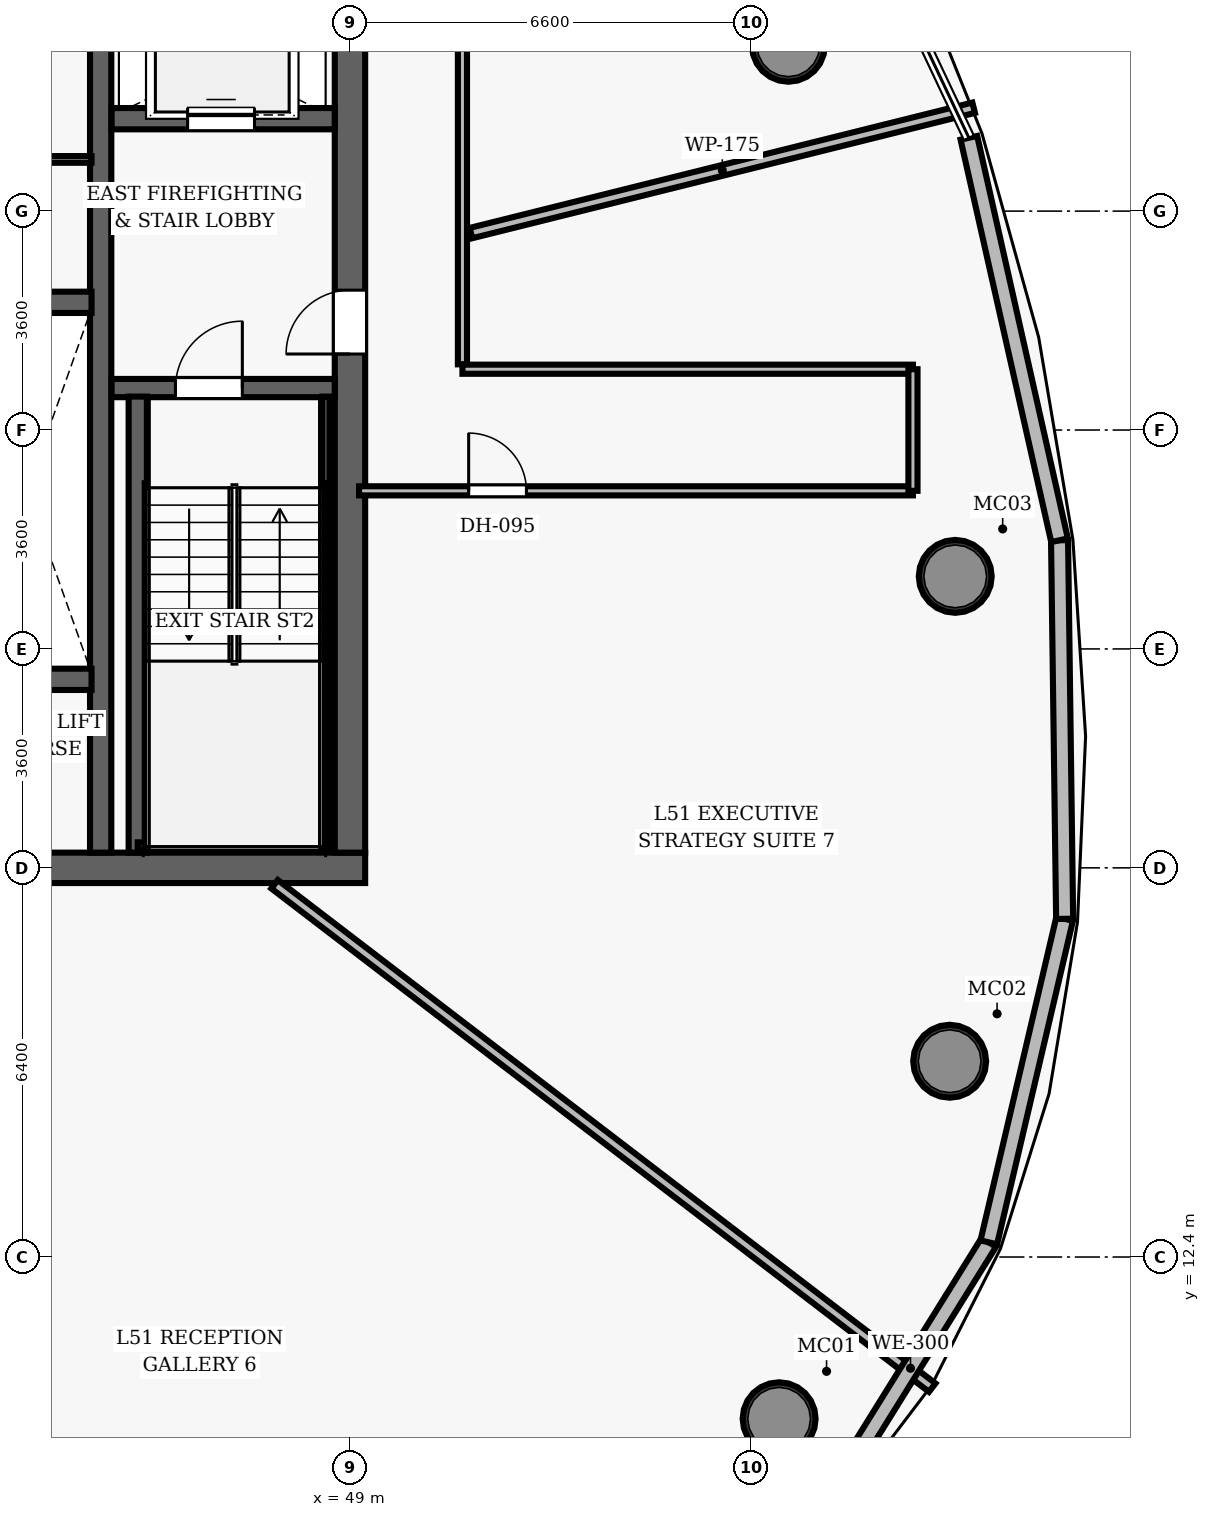
"""IFC4 building model, lengths in metres.
Left out: names, types, materials, properties, quantities, classifications, styles, units other than length and angle.
Written with IfcOpenShell. Run it as: python <this file> out.ifc"""

import sys

from ifc_helpers import new_model, si_unit, direction, frame, frame_2d, origin, origin_2d, place, context, subcontext, project, spatial, rectangle, hollow_circle, extrude, element, fill, save


model = new_model("IFC4")
c1 = context("Model", 3, precision=1e-05, world=origin(), true_north=direction((0.0, 1.0)))
c2 = subcontext(c1, "Body", "Model", "MODEL_VIEW")
j1 = project(units=[si_unit("LENGTHUNIT", "METRE"), si_unit("PLANEANGLEUNIT", "RADIAN")], contexts=[c1])
p1 = place(None, origin())
s1 = spatial("IfcSite", under=j1, at=p1, CompositionType="ELEMENT")
p2 = place(p1, origin())
s2 = spatial("IfcBuilding", under=s1, at=p2, CompositionType="ELEMENT")
p3 = place(p2, frame((0.0, 0.0, 202.0)))
s3 = spatial("IfcBuildingStorey", under=s2, at=p3, CompositionType="ELEMENT", Elevation=202.0)
p4 = place(p3, frame((26.75, 18.8, 0.0), z_axis=(0.0, 0.0, 1.0), x_axis=(1.0, 0.0, 0.0)))
e1 = element("IfcWall", 1, at=p4, inside=s3, PredefinedType="SHEAR", context=c2, shape_type="SweptSolid", body=[
    extrude(rectangle(XDim=22.5, YDim=0.5, at=frame_2d((11.25, 0.0))), origin(), (0.0, 0.0, 1.0), 3.85),
])
p5 = place(p4, frame((14.47, 0.0, 0.0)))
e2 = element("IfcOpeningElement", 2, at=p5, cuts=e1, PredefinedType="OPENING", context=c2, shape_type="SweptSolid", body=[
    extrude(rectangle(XDim=1.05, YDim=2.15, at=frame_2d((0.525, 1.075))), frame((0.0, 0.26, 0.0), z_axis=(0.0, -1.0, 0.0), x_axis=(1.0, 0.0, 0.0)), (0.0, 0.0, 1.0), 0.52),
])
p6 = place(p3, frame((49.0, 19.05, 0.0), z_axis=(0.0, 0.0, 1.0), x_axis=(0.0, 1.0, 0.0)))
e3 = element("IfcWall", 3, at=p6, inside=s3, PredefinedType="SHEAR", context=c2, shape_type="SweptSolid", body=[
    extrude(rectangle(XDim=13.9, YDim=0.5, at=frame_2d((6.95, 0.0))), origin(), (0.0, 0.0, 1.0), 3.85),
])
p7 = place(p6, frame((8.2, 0.0, 0.0)))
e4 = element("IfcOpeningElement", 4, at=p7, cuts=e3, PredefinedType="OPENING", context=c2, shape_type="SweptSolid", body=[
    extrude(rectangle(XDim=1.05, YDim=2.15, at=frame_2d((0.525, 1.075))), frame((0.0, 0.26, 0.0), z_axis=(0.0, -1.0, 0.0), x_axis=(1.0, 0.0, 0.0)), (0.0, 0.0, 1.0), 0.52),
])
p8 = place(p3, frame((44.9, 19.05, 0.0), z_axis=(0.0, 0.0, 1.0), x_axis=(0.0, 1.0, 0.0)))
e5 = element("IfcWall", 5, at=p8, inside=s3, PredefinedType="SHEAR", context=c2, shape_type="SweptSolid", body=[
    extrude(rectangle(XDim=13.9, YDim=0.35, at=frame_2d((6.95, 0.0))), origin(), (0.0, 0.0, 1.0), 3.85),
])
for number, where, z_axis, x_axis in (
    (6, (56.058, 9.74, 0.0), (0.0, 0.0, 1.0), (1.0, 0.0, 0.0)),
    (7, (58.863, 15.619, 0.0), (0.0, 0.0, 1.0), (1.0, 0.0, 0.0)),
    (8, (58.955, 23.594, 0.0), (0.0, 0.0, 1.0), (1.0, 0.0, 0.0)),
    (9, (56.21, 32.327, 0.0), (0.0, 0.0, 1.0), (1.0, 0.0, 0.0)),
):
    element("IfcColumn", number, at=place(p3, frame(where, z_axis=z_axis, x_axis=x_axis)), inside=s3, PredefinedType="COLUMN", context=c2, shape_type="SweptSolid", body=[
        extrude(hollow_circle(Radius=0.6, WallThickness=0.05, at=origin_2d()), origin(), (0.0, 0.0, 1.0), 3.85),
    ])
p9 = place(p3, frame((45.08, 26.69, 0.0), z_axis=(0.0, 0.0, 1.0), x_axis=(1.0, 0.0, 0.0)))
e10 = element("IfcWall", 10, at=p9, inside=s3, PredefinedType="SHEAR", context=c2, shape_type="SweptSolid", body=[
    extrude(rectangle(XDim=3.67, YDim=0.3, at=frame_2d((1.835, 0.0))), origin(), (0.0, 0.0, 1.0), 3.85),
])
p10 = place(p9, frame((1.05, 0.0, 0.0)))
e11 = element("IfcOpeningElement", 11, at=p10, cuts=e10, PredefinedType="OPENING", context=c2, shape_type="SweptSolid", body=[
    extrude(rectangle(XDim=1.1, YDim=2.15, at=frame_2d((0.55, 1.075))), frame((0.0, 0.16, 0.0), z_axis=(0.0, -1.0, 0.0), x_axis=(1.0, 0.0, 0.0)), (0.0, 0.0, 1.0), 0.32),
])
p11 = place(p3, frame((45.51, 19.05, 0.0), z_axis=(0.0, 0.0, 1.0), x_axis=(0.0, 1.0, 0.0)))
e12 = element("IfcWall", 12, at=p11, inside=s3, PredefinedType="SHEAR", context=c2, shape_type="SweptSolid", body=[
    extrude(rectangle(XDim=7.5, YDim=0.3, at=frame_2d((3.75, 0.0))), origin(), (0.0, 0.0, 1.0), 3.85),
])
p12 = place(p3, frame((48.605, 19.1, 0.0), z_axis=(0.0, 0.0, 1.0), x_axis=(0.0, 1.0, 0.0)))
e13 = element("IfcWall", 13, at=p12, inside=s3, PredefinedType="SHEAR", context=c2, shape_type="SweptSolid", body=[
    extrude(rectangle(XDim=7.45, YDim=0.12, at=frame_2d((3.725, 0.0))), origin(), (0.0, 0.0, 1.0), 3.85),
])
p13 = place(p3, frame((45.51, 19.16, 0.0), z_axis=(0.0, 0.0, 1.0), x_axis=(1.0, 0.0, 0.0)))
e14 = element("IfcWall", 14, at=p13, inside=s3, PredefinedType="SHEAR", context=c2, shape_type="SweptSolid", body=[
    extrude(rectangle(XDim=3.095, YDim=0.12, at=frame_2d((1.547, 0.0))), origin(), (0.0, 0.0, 1.0), 3.85),
])
p14 = place(p3, frame((45.08, 31.12, 0.0), z_axis=(0.0, 0.0, 1.0), x_axis=(1.0, 0.0, 0.0)))
e15 = element("IfcWall", 15, at=p14, inside=s3, PredefinedType="SHEAR", context=c2, shape_type="SweptSolid", body=[
    extrude(rectangle(XDim=3.67, YDim=0.35, at=frame_2d((1.835, 0.0))), origin(), (0.0, 0.0, 1.0), 3.035),
])
p15 = place(p14, frame((1.25, 0.0, 0.0)))
e16 = element("IfcOpeningElement", 16, at=p15, cuts=e15, PredefinedType="OPENING", context=c2, shape_type="SweptSolid", body=[
    extrude(rectangle(XDim=1.1, YDim=2.15, at=frame_2d((0.55, 1.075))), frame((0.0, 0.185, 0.0), z_axis=(0.0, -1.0, 0.0), x_axis=(1.0, 0.0, 0.0)), (0.0, 0.0, 1.0), 0.37),
])
for number, where, z_axis, x_axis in (
    (17, (42.72, 21.9, 0.0), (0.0, 0.0, 1.0), (1.0, 0.0, 0.0)),
    (18, (42.72, 28.1, 0.0), (0.0, 0.0, 1.0), (1.0, 0.0, 0.0)),
):
    element("IfcWall", number, at=place(p3, frame(where, z_axis=z_axis, x_axis=x_axis)), inside=s3, PredefinedType="SHEAR", context=c2, shape_type="SweptSolid", body=[
        extrude(rectangle(XDim=2.03, YDim=0.35, at=frame_2d((1.015, 0.0))), origin(), (0.0, 0.0, 1.0), 3.035),
    ])
p16 = place(p3, frame((42.55, 30.45, 0.0), z_axis=(0.0, 0.0, 1.0), x_axis=(1.0, 0.0, 0.0)))
e19 = element("IfcWall", 19, at=p16, inside=s3, PredefinedType="PARTITIONING", context=c2, shape_type="SweptSolid", body=[
    extrude(rectangle(XDim=2.2, YDim=0.11, at=frame_2d((1.1, 0.0))), origin(), (0.0, 0.0, 1.0), 3.035),
])
p17 = place(p3, frame((50.85, 27.08, 0.0), z_axis=(0.0, 0.0, 1.0), x_axis=(0.0, 1.0, 0.0)))
e20 = element("IfcWall", 20, at=p17, inside=s3, PredefinedType="PARTITIONING", context=c2, shape_type="SweptSolid", body=[
    extrude(rectangle(XDim=8.12, YDim=0.15, at=frame_2d((4.06, 0.0))), origin(), (0.0, 0.0, 1.0), 3.035),
])
p18 = place(p3, frame((50.85, 27.0, 0.0), z_axis=(0.0, 0.0, 1.0), x_axis=(1.0, 0.0, 0.0)))
e21 = element("IfcWall", 21, at=p18, inside=s3, PredefinedType="PARTITIONING", context=c2, shape_type="SweptSolid", body=[
    extrude(rectangle(XDim=7.409, YDim=0.15, at=frame_2d((3.705, 0.0))), origin(), (0.0, 0.0, 1.0), 3.035),
])
p19 = place(p3, frame((49.15, 25.0, 0.0), z_axis=(0.0, 0.0, 1.0), x_axis=(1.0, 0.0, 0.0)))
e22 = element("IfcWall", 22, at=p19, inside=s3, PredefinedType="PARTITIONING", context=c2, shape_type="SweptSolid", body=[
    extrude(rectangle(XDim=9.109, YDim=0.15, at=frame_2d((4.555, 0.0))), origin(), (0.0, 0.0, 1.0), 3.035),
])
p20 = place(p19, frame((1.802, 0.0, 0.0)))
e23 = element("IfcOpeningElement", 23, at=p20, cuts=e22, PredefinedType="OPENING", context=c2, shape_type="SweptSolid", body=[
    extrude(rectangle(XDim=0.95, YDim=2.15, at=frame_2d((0.475, 1.075))), frame((0.0, 0.085, 0.0), z_axis=(0.0, -1.0, 0.0), x_axis=(1.0, 0.0, 0.0)), (0.0, 0.0, 1.0), 0.17),
])
p21 = place(p3, frame((58.259, 25.0, 0.0), z_axis=(0.0, 0.0, 1.0), x_axis=(0.0, 1.0, 0.0)))
e24 = element("IfcWall", 24, at=p21, inside=s3, PredefinedType="PARTITIONING", context=c2, shape_type="SweptSolid", body=[
    extrude(rectangle(XDim=2.0, YDim=0.15, at=frame_2d((1.0, 0.0))), origin(), (0.0, 0.0, 1.0), 3.035),
])
p22 = place(p3, frame((50.99, 29.239, 0.0), z_axis=(0.0, 0.0, 1.0), x_axis=(0.970292315067, 0.241935576803, 0.0)))
e25 = element("IfcWall", 25, at=p22, inside=s3, PredefinedType="PARTITIONING", context=c2, shape_type="SweptSolid", body=[
    extrude(rectangle(XDim=8.521, YDim=0.175, at=frame_2d((4.26, 0.0))), origin(), (0.0, 0.0, 1.0), 3.035),
])
p23 = place(p3, frame((47.76, 18.53, 0.0), z_axis=(0.0, 0.0, 1.0), x_axis=(0.794115585975, -0.607766761276, 0.0)))
e26 = element("IfcWall", 26, at=p23, inside=s3, PredefinedType="PARTITIONING", context=c2, shape_type="SweptSolid", body=[
    extrude(rectangle(XDim=13.62, YDim=0.175, at=frame_2d((6.81, 0.0))), origin(), (0.0, 0.0, 1.0), 3.035),
])
p24 = place(p3, frame((59.506, 12.641, 0.0), z_axis=(0.0, 0.0, 1.0), x_axis=(-0.528161516042, -0.849143929479, 0.0)))
e27 = element("IfcWall", 27, at=p24, inside=s3, PredefinedType="SOLIDWALL", context=c2, shape_type="SweptSolid", body=[
    extrude(rectangle(XDim=4.876, YDim=0.28, at=frame_2d((2.438, 0.0))), origin(), (0.0, 0.0, 1.0), 3.62),
])
p25 = place(p3, frame((60.754, 17.961, 0.0), z_axis=(0.0, 0.0, 1.0), x_axis=(-0.228307127512, -0.97358916157, 0.0)))
e28 = element("IfcWall", 28, at=p25, inside=s3, PredefinedType="SOLIDWALL", context=c2, shape_type="SweptSolid", body=[
    extrude(rectangle(XDim=5.464, YDim=0.28, at=frame_2d((2.732, 0.0))), origin(), (0.0, 0.0, 1.0), 3.62),
])
p26 = place(p3, frame((60.67, 24.187, 0.0), z_axis=(0.0, 0.0, 1.0), x_axis=(0.013448709112, -0.999909562022, 0.0)))
e29 = element("IfcWall", 29, at=p26, inside=s3, PredefinedType="SOLIDWALL", context=c2, shape_type="SweptSolid", body=[
    extrude(rectangle(XDim=6.227, YDim=0.28, at=frame_2d((3.113, 0.0))), origin(), (0.0, 0.0, 1.0), 3.62),
])
p27 = place(p3, frame((59.179, 30.806, 0.0), z_axis=(0.0, 0.0, 1.0), x_axis=(0.219794754914, -0.975546137152, 0.0)))
e30 = element("IfcWall", 30, at=p27, inside=s3, PredefinedType="SOLIDWALL", context=c2, shape_type="SweptSolid", body=[
    extrude(rectangle(XDim=6.785, YDim=0.28, at=frame_2d((3.392, 0.0))), origin(), (0.0, 0.0, 1.0), 3.62),
])
p28 = place(p10, origin())
e31 = element("IfcDoor", 31, at=p28, inside=s3, OperationType="SINGLE_SWING_RIGHT", PredefinedType="DOOR", context=c2, shape_type="SweptSolid", body=[
    extrude(rectangle(XDim=1.1, YDim=2.15, at=frame_2d((0.55, 1.075))), frame((0.0, 0.025, 0.0), z_axis=(0.0, -1.0, 0.0), x_axis=(1.0, 0.0, 0.0)), (0.0, 0.0, 1.0), 0.05),
])
fill(e11, e31)
p29 = place(p7, origin())
e32 = element("IfcDoor", 32, at=p29, inside=s3, OperationType="SINGLE_SWING_LEFT", PredefinedType="DOOR", context=c2, shape_type="SweptSolid", body=[
    extrude(rectangle(XDim=1.05, YDim=2.15, at=frame_2d((0.525, 1.075))), frame((0.0, 0.025, 0.0), z_axis=(0.0, -1.0, 0.0), x_axis=(1.0, 0.0, 0.0)), (0.0, 0.0, 1.0), 0.05),
])
fill(e4, e32)
p30 = place(p20, origin())
e33 = element("IfcDoor", 33, at=p30, inside=s3, OperationType="SINGLE_SWING_LEFT", PredefinedType="DOOR", context=c2, shape_type="SweptSolid", body=[
    extrude(rectangle(XDim=0.95, YDim=2.15, at=frame_2d((0.475, 1.075))), frame((0.0, 0.025, 0.0), z_axis=(0.0, -1.0, 0.0), x_axis=(1.0, 0.0, 0.0)), (0.0, 0.0, 1.0), 0.05),
])
fill(e23, e33)
p31 = place(p15, origin())
e34 = element("IfcDoor", 34, at=p31, inside=s3, OperationType="SLIDING_TO_LEFT", PredefinedType="DOOR", context=c2, shape_type="SweptSolid", body=[
    extrude(rectangle(XDim=1.1, YDim=2.15, at=frame_2d((0.55, 1.075))), frame((0.0, 0.025, 0.0), z_axis=(0.0, -1.0, 0.0), x_axis=(1.0, 0.0, 0.0)), (0.0, 0.0, 1.0), 0.05),
])
fill(e16, e34)
save(model, sys.argv[1])
